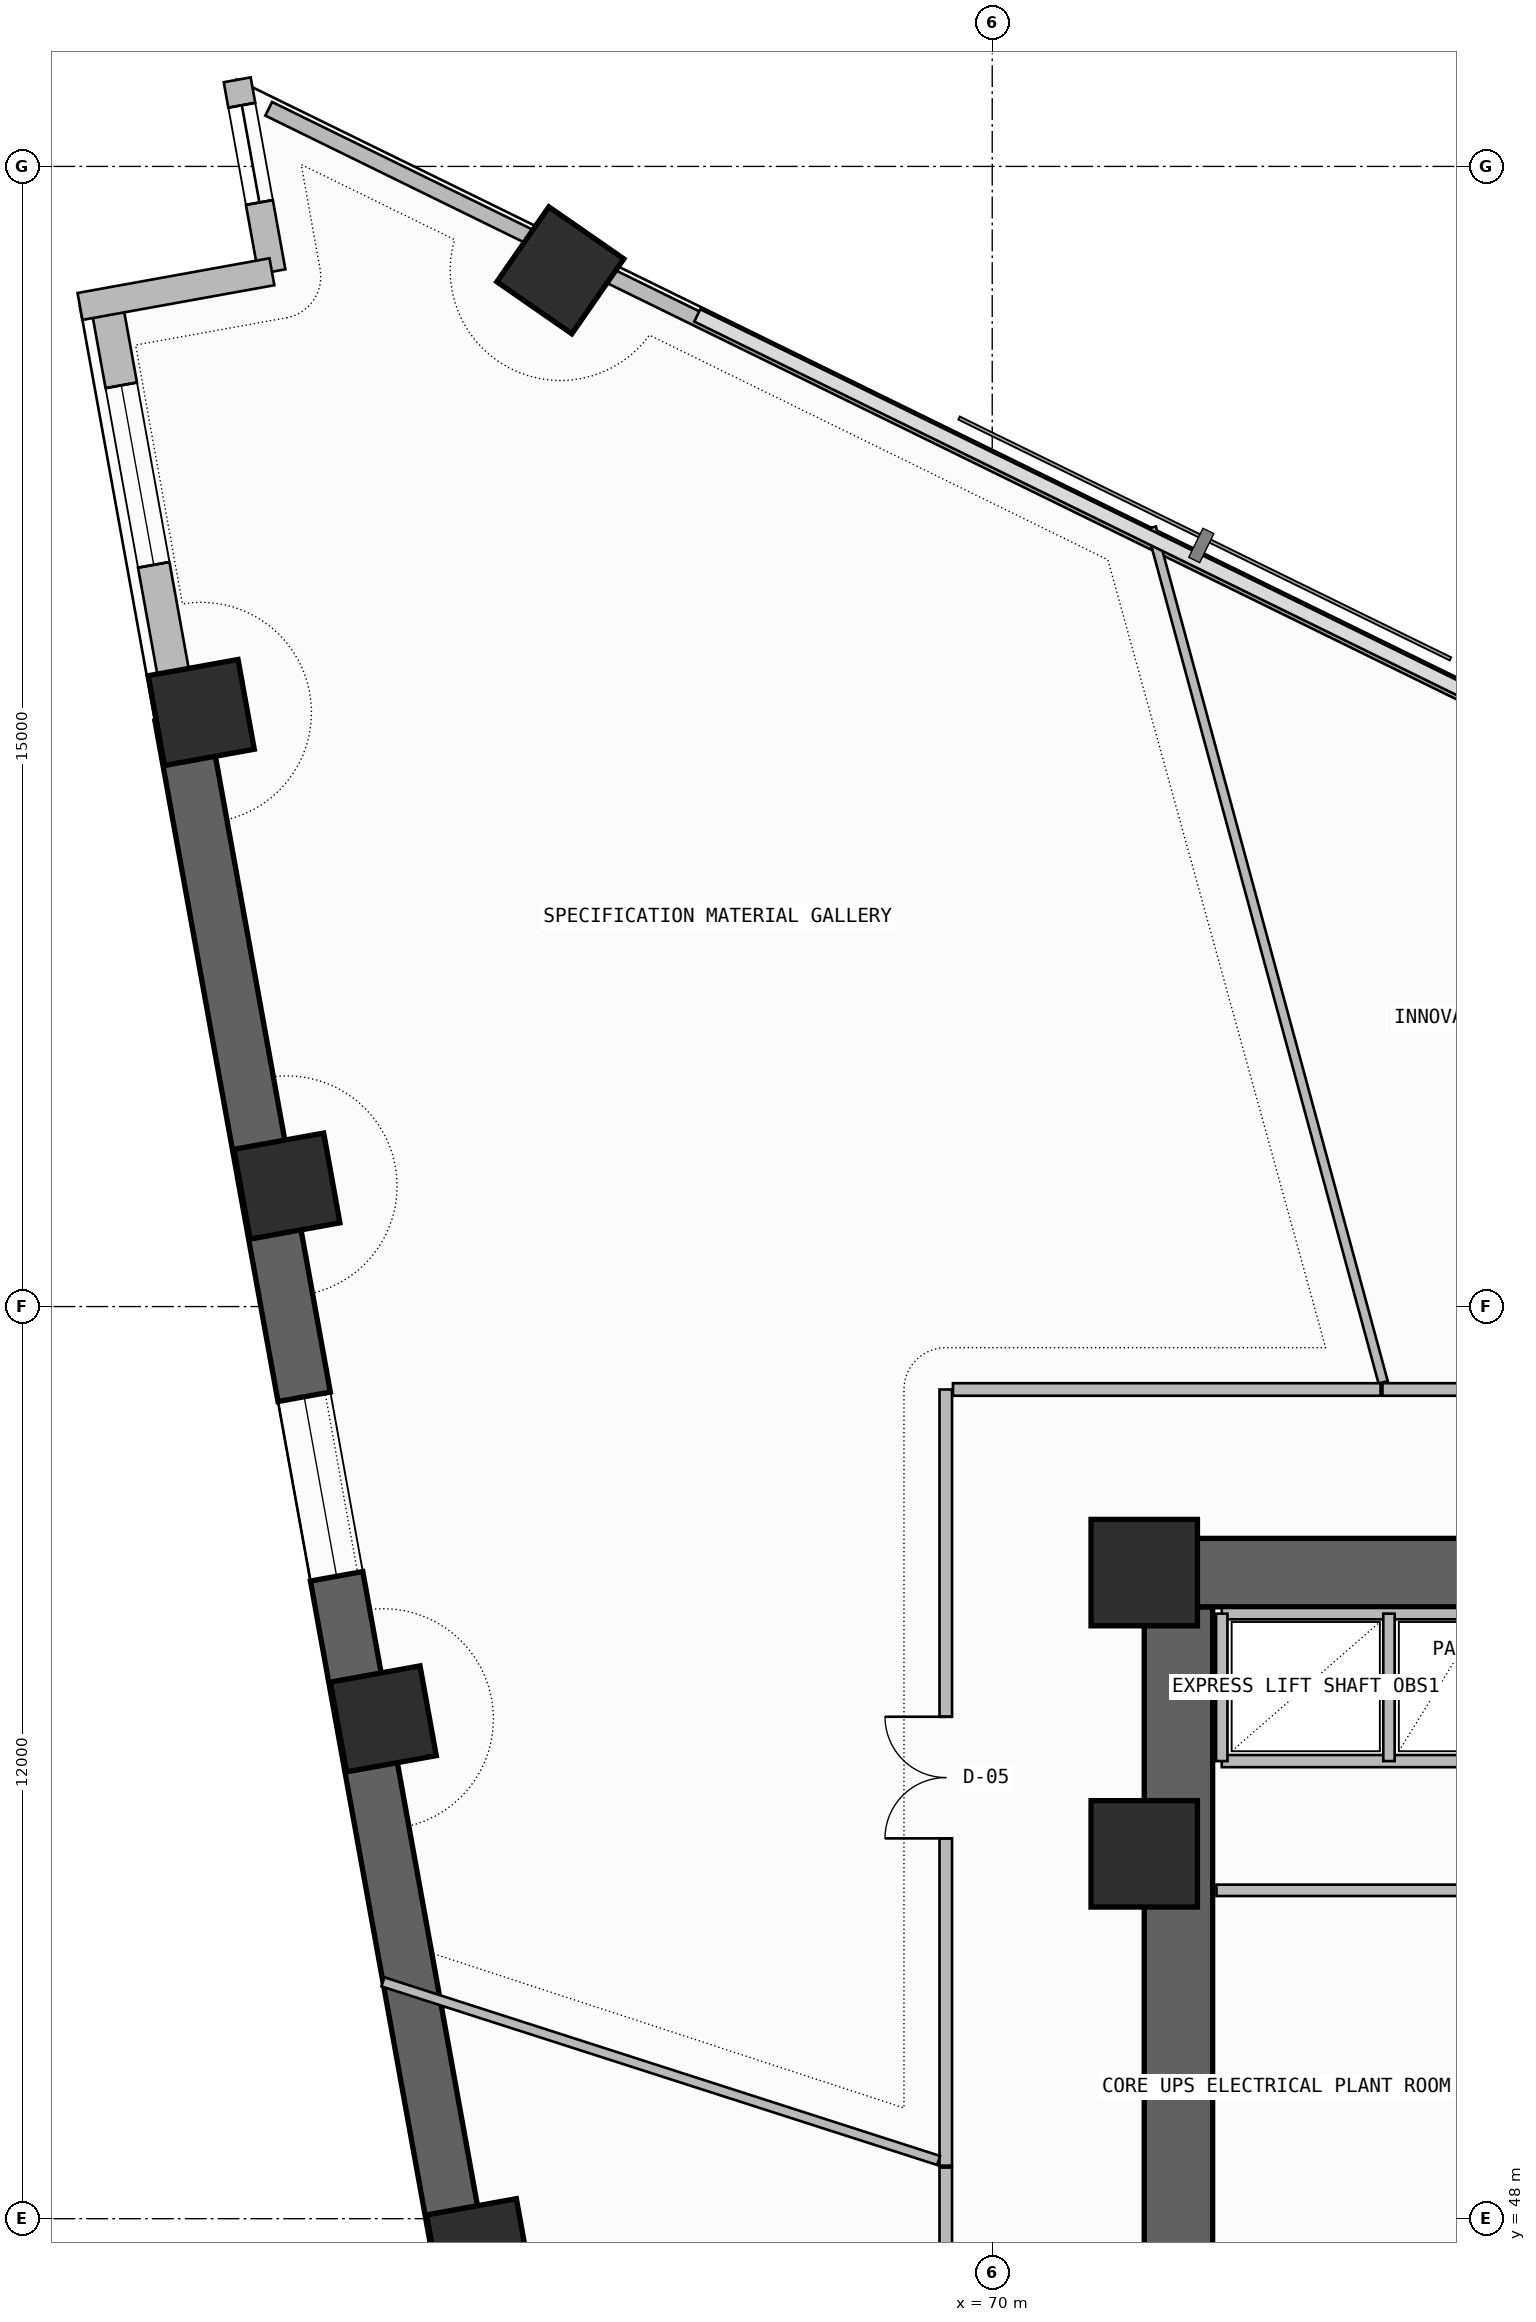
"""IFC4 building model, lengths in metres.
Left out: names, types, materials, properties, quantities, classifications, styles, units other than length and angle.
Written with IfcOpenShell. Run it as: python <this file> out.ifc"""

import sys

from ifc_helpers import new_model, si_unit, direction, frame, frame_2d, origin, origin_2d, place, context, subcontext, project, spatial, rectangle, extrude, element, fill, save


model = new_model("IFC4")
c1 = context("Model", 3, precision=1e-05, world=origin(), true_north=direction((0.0, 1.0)))
c2 = subcontext(c1, "Body", "Model", "MODEL_VIEW")
j1 = project(units=[si_unit("LENGTHUNIT", "METRE"), si_unit("PLANEANGLEUNIT", "RADIAN")], contexts=[c1])
p1 = place(None, origin())
s1 = spatial("IfcSite", under=j1, at=p1, CompositionType="ELEMENT")
p2 = place(p1, origin())
s2 = spatial("IfcBuilding", under=s1, at=p2, CompositionType="ELEMENT")
p3 = place(p2, frame((0.0, 0.0, 110.1)))
s3 = spatial("IfcBuildingStorey", under=s2, at=p3, CompositionType="ELEMENT", Elevation=110.1)
p4 = place(p3, frame((72.45, 43.35, -0.26), z_axis=(0.0, 0.0, 1.0), x_axis=(0.0, 1.0, 0.0)))
e1 = element("IfcWall", 1, at=p4, inside=s3, PredefinedType="SHEAR", context=c2, shape_type="SweptSolid", body=[
    extrude(rectangle(XDim=12.7, YDim=0.9, at=frame_2d((6.35, 0.0))), origin(), (0.0, 0.0, 1.0), 3.6),
])
p5 = place(p4, frame((1.35, 0.0, 0.26)))
e2 = element("IfcOpeningElement", 2, at=p5, cuts=e1, PredefinedType="OPENING", context=c2, shape_type="SweptSolid", body=[
    extrude(rectangle(XDim=1.2, YDim=2.2, at=frame_2d((0.6, 1.1))), frame((0.0, 0.46, 0.0), z_axis=(0.0, -1.0, 0.0), x_axis=(1.0, 0.0, 0.0)), (0.0, 0.0, 1.0), 0.92),
])
p6 = place(p3, frame((72.0, 56.5, -0.26), z_axis=(0.0, 0.0, 1.0), x_axis=(1.0, 0.0, 0.0)))
e3 = element("IfcWall", 3, at=p6, inside=s3, PredefinedType="SHEAR", context=c2, shape_type="SweptSolid", body=[
    extrude(rectangle(XDim=13.9, YDim=0.9, at=frame_2d((6.95, 0.0))), origin(), (0.0, 0.0, 1.0), 3.6),
])
for number, where, z_axis, x_axis in (
    (4, (72.0, 52.8, 0.0), (0.0, 0.0, 1.0), (1.0, 0.0, 0.0)),
    (5, (72.0, 56.5, 0.0), (0.0, 0.0, 1.0), (1.0, 0.0, 0.0)),
):
    element("IfcColumn", number, at=place(p3, frame(where, z_axis=z_axis, x_axis=x_axis)), inside=s3, PredefinedType="COLUMN", context=c2, shape_type="SweptSolid", body=[
        extrude(rectangle(XDim=1.4, YDim=1.4, at=origin_2d()), origin(), (0.0, 0.0, 1.0), 3.6),
    ])
for number, where, z_axis, x_axis in (
    (6, (64.318, 73.633, 0.0), (0.0, 0.0, 1.0), (0.57, 0.822, 0.0)),
    (7, (59.594, 67.816, 0.0), (0.0, 0.0, 1.0), (-0.178, 0.984, 0.0)),
    (8, (60.72, 61.585, 0.0), (0.0, 0.0, 1.0), (-0.178, 0.984, 0.0)),
    (9, (61.988, 54.575, 0.0), (0.0, 0.0, 1.0), (-0.178, 0.984, 0.0)),
    (10, (63.255, 47.566, 0.0), (0.0, 0.0, 1.0), (-0.178, 0.984, 0.0)),
):
    element("IfcColumn", number, at=place(p3, frame(where, z_axis=z_axis, x_axis=x_axis)), inside=s3, PredefinedType="COLUMN", context=c2, shape_type="SweptSolid", body=[
        extrude(rectangle(XDim=1.2, YDim=1.2, at=origin_2d()), origin(), (0.0, 0.0, 1.0), 3.6),
    ])
p7 = place(p3, frame((58.342, 73.22, 0.0), z_axis=(0.0, 0.0, 1.0), x_axis=(0.177981837245, -0.984033772597, 0.0)))
e11 = element("IfcWall", 11, at=p7, inside=s3, PredefinedType="SOLIDWALL", context=c2, shape_type="SweptSolid", body=[
    extrude(rectangle(XDim=5.54, YDim=0.42, at=frame_2d((2.77, 0.0))), origin(), (0.0, 0.0, 1.0), 2.725),
])
p8 = place(p7, frame((1.118, 0.0, 1.2)))
e12 = element("IfcOpeningElement", 12, at=p8, cuts=e11, PredefinedType="OPENING", context=c2, shape_type="SweptSolid", body=[
    extrude(rectangle(XDim=2.4, YDim=0.9, at=frame_2d((1.2, 0.45))), frame((0.0, 0.22, 0.0), z_axis=(0.0, -1.0, 0.0), x_axis=(1.0, 0.0, 0.0)), (0.0, 0.0, 1.0), 0.44),
])
p9 = place(p3, frame((59.328, 67.768, -0.26), z_axis=(0.0, 0.0, 1.0), x_axis=(0.177933213615, -0.984042565895, 0.0)))
e13 = element("IfcWall", 13, at=p9, inside=s3, PredefinedType="SHEAR", context=c2, shape_type="SweptSolid", body=[
    extrude(rectangle(XDim=20.579, YDim=0.7, at=frame_2d((10.289, 0.0))), origin(), (0.0, 0.0, 1.0), 3.6),
])
p10 = place(p9, frame((9.1, 0.0, 1.2)))
e14 = element("IfcOpeningElement", 14, at=p10, cuts=e13, PredefinedType="OPENING", context=c2, shape_type="SweptSolid", body=[
    extrude(rectangle(XDim=2.4, YDim=0.9, at=frame_2d((1.2, 0.45))), frame((0.0, 0.36, 0.0), z_axis=(0.0, -1.0, 0.0), x_axis=(1.0, 0.0, 0.0)), (0.0, 0.0, 1.0), 0.72),
])
p11 = place(p3, frame((60.066, 76.139, 0.0), z_axis=(0.0, 0.0, 1.0), x_axis=(0.177897493713, -0.984049024048, 0.0)))
e15 = element("IfcWall", 15, at=p11, inside=s3, PredefinedType="SOLIDWALL", context=c2, shape_type="SweptSolid", body=[
    extrude(rectangle(XDim=2.566, YDim=0.36, at=frame_2d((1.283, 0.0))), origin(), (0.0, 0.0, 1.0), 3.34),
])
p12 = place(p11, frame((0.34, 0.0, 0.45)))
e16 = element("IfcOpeningElement", 16, at=p12, cuts=e15, PredefinedType="OPENING", context=c2, shape_type="SweptSolid", body=[
    extrude(rectangle(XDim=1.3, YDim=2.4, at=frame_2d((0.65, 1.2))), frame((0.0, 0.19, 0.0), z_axis=(0.0, -1.0, 0.0), x_axis=(1.0, 0.0, 0.0)), (0.0, 0.0, 1.0), 0.38),
])
p13 = place(p3, frame((60.523, 73.614, 0.0), z_axis=(0.0, 0.0, 1.0), x_axis=(-0.984046012923, -0.177914149102, 0.0)))
e17 = element("IfcWall", 17, at=p13, inside=s3, PredefinedType="SOLIDWALL", context=c2, shape_type="SweptSolid", body=[
    extrude(rectangle(XDim=2.566, YDim=0.36, at=frame_2d((1.283, 0.0))), origin(), (0.0, 0.0, 1.0), 3.34),
])
p14 = place(p3, frame((88.921, 61.823, 0.0), z_axis=(0.0, 0.0, 1.0), x_axis=(-0.897993533426, 0.440008652103, 0.0)))
e18 = element("IfcWall", 18, at=p14, inside=s3, PredefinedType="PARAPET", context=c2, shape_type="SweptSolid", body=[
    extrude(rectangle(XDim=26.864, YDim=0.2, at=frame_2d((13.432, 0.0))), origin(), (0.0, 0.0, 1.0), 1.15),
])
p15 = place(p3, frame((64.032, 74.018, 0.0), z_axis=(0.0, 0.0, 1.0), x_axis=(-0.89799103332, 0.440013754417, 0.0)))
e19 = element("IfcWall", 19, at=p15, inside=s3, PredefinedType="PARAPET", context=c2, shape_type="SweptSolid", body=[
    extrude(rectangle(XDim=3.955, YDim=0.2, at=frame_2d((1.978, 0.0))), origin(), (0.0, 0.0, 1.0), 1.15),
])
p16 = place(p3, frame((72.95, 52.32, 0.0), z_axis=(0.0, 0.0, 1.0), x_axis=(1.0, 0.0, 0.0)))
e20 = element("IfcWall", 20, at=p16, inside=s3, PredefinedType="SOLIDWALL", context=c2, shape_type="SweptSolid", body=[
    extrude(rectangle(XDim=3.33, YDim=0.15, at=frame_2d((1.665, 0.0))), origin(), (0.0, 0.0, 1.0), 3.34),
])
p17 = place(p3, frame((73.02, 54.02, 0.0), z_axis=(0.0, 0.0, 1.0), x_axis=(1.0, 0.0, 0.0)))
e21 = element("IfcWall", 21, at=p17, inside=s3, PredefinedType="SOLIDWALL", context=c2, shape_type="SweptSolid", body=[
    extrude(rectangle(XDim=12.08, YDim=0.16, at=frame_2d((6.04, 0.0))), origin(), (0.0, 0.0, 1.0), 3.34),
])
p18 = place(p3, frame((73.02, 55.96, 0.0), z_axis=(0.0, 0.0, 1.0), x_axis=(1.0, 0.0, 0.0)))
e22 = element("IfcWall", 22, at=p18, inside=s3, PredefinedType="SOLIDWALL", context=c2, shape_type="SweptSolid", body=[
    extrude(rectangle(XDim=3.5, YDim=0.15, at=frame_2d((1.75, 0.0))), origin(), (0.0, 0.0, 1.0), 3.34),
])
for number, where, z_axis, x_axis in (
    (23, (73.02, 54.02, 0.0), (0.0, 0.0, 1.0), (0.0, 1.0, 0.0)),
    (24, (75.22, 54.02, 0.0), (0.0, 0.0, 1.0), (0.0, 1.0, 0.0)),
):
    element("IfcWall", number, at=place(p3, frame(where, z_axis=z_axis, x_axis=x_axis)), inside=s3, PredefinedType="PLUMBINGWALL", context=c2, shape_type="SweptSolid", body=[
        extrude(rectangle(XDim=1.94, YDim=0.15, at=frame_2d((0.97, 0.0))), origin(), (0.0, 0.0, 1.0), 3.34),
    ])
p19 = place(p3, frame((84.151, 58.909, 0.0), z_axis=(0.0, 0.0, 1.0), x_axis=(-1.0, 0.0, 0.0)))
e25 = element("IfcWall", 25, at=p19, inside=s3, PredefinedType="PARTITIONING", context=c2, shape_type="SweptSolid", body=[
    extrude(rectangle(XDim=9.017, YDim=0.165, at=frame_2d((4.508, 0.0))), origin(), (0.0, 0.0, 1.0), 3.34),
])
p20 = place(p19, frame((4.008, 0.0, 0.0)))
e26 = element("IfcOpeningElement", 26, at=p20, cuts=e25, PredefinedType="OPENING", context=c2, shape_type="SweptSolid", body=[
    extrude(rectangle(XDim=1.0, YDim=2.2, at=frame_2d((0.5, 1.1))), frame((0.0, 0.093, 0.0), z_axis=(0.0, -1.0, 0.0), x_axis=(1.0, 0.0, 0.0)), (0.0, 0.0, 1.0), 0.185),
])
p21 = place(p3, frame((75.144, 59.003, 0.0), z_axis=(0.0, 0.0, 1.0), x_axis=(-0.261861678482, 0.965105414627, 0.0)))
e27 = element("IfcWall", 27, at=p21, inside=s3, PredefinedType="PARTITIONING", context=c2, shape_type="SweptSolid", body=[
    extrude(rectangle(XDim=11.649, YDim=0.125, at=frame_2d((5.825, 0.0))), origin(), (0.0, 0.0, 1.0), 3.34),
])
p22 = place(p3, frame((69.389, 58.909, 0.0), z_axis=(0.0, 0.0, 1.0), x_axis=(0.0, -1.0, 0.0)))
e28 = element("IfcWall", 28, at=p22, inside=s3, PredefinedType="PARTITIONING", context=c2, shape_type="SweptSolid", body=[
    extrude(rectangle(XDim=10.211, YDim=0.165, at=frame_2d((5.105, 0.0))), origin(), (0.0, 0.0, 1.0), 2.725),
])
p23 = place(p22, frame((4.306, 0.0, 0.0)))
e29 = element("IfcOpeningElement", 29, at=p23, cuts=e28, PredefinedType="OPENING", context=c2, shape_type="SweptSolid", body=[
    extrude(rectangle(XDim=1.6, YDim=2.3, at=frame_2d((0.8, 1.15))), frame((0.0, 0.093, 0.0), z_axis=(0.0, -1.0, 0.0), x_axis=(1.0, 0.0, 0.0)), (0.0, 0.0, 1.0), 0.185),
])
p24 = place(p3, frame((75.109, 58.909, 0.0), z_axis=(0.0, 0.0, 1.0), x_axis=(-1.0, 0.0, 0.0)))
e30 = element("IfcWall", 30, at=p24, inside=s3, PredefinedType="PARTITIONING", context=c2, shape_type="SweptSolid", body=[
    extrude(rectangle(XDim=5.626, YDim=0.165, at=frame_2d((2.813, 0.0))), origin(), (0.0, 0.0, 1.0), 2.725),
])
p25 = place(p3, frame((69.294, 48.766, 0.0), z_axis=(0.0, 0.0, 1.0), x_axis=(-0.952039476867, 0.305975218747, 0.0)))
e31 = element("IfcWall", 31, at=p25, inside=s3, PredefinedType="PARTITIONING", context=c2, shape_type="SweptSolid", body=[
    extrude(rectangle(XDim=7.679, YDim=0.125, at=frame_2d((3.84, 0.0))), origin(), (0.0, 0.0, 1.0), 2.725),
])
p26 = place(p3, frame((69.389, 48.673, 0.0), z_axis=(0.0, 0.0, 1.0), x_axis=(0.0, -1.0, 0.0)))
e32 = element("IfcWall", 32, at=p26, inside=s3, PredefinedType="PARTITIONING", context=c2, shape_type="SweptSolid", body=[
    extrude(rectangle(XDim=6.346, YDim=0.165, at=frame_2d((3.173, 0.0))), origin(), (0.0, 0.0, 1.0), 3.34),
])
p27 = place(p26, frame((2.673, 0.0, 0.0)))
e33 = element("IfcOpeningElement", 33, at=p27, cuts=e32, PredefinedType="OPENING", context=c2, shape_type="SweptSolid", body=[
    extrude(rectangle(XDim=1.0, YDim=2.2, at=frame_2d((0.5, 1.1))), frame((0.0, 0.093, 0.0), z_axis=(0.0, -1.0, 0.0), x_axis=(1.0, 0.0, 0.0)), (0.0, 0.0, 1.0), 0.185),
])
p28 = place(p8, origin())
e34 = element("IfcWindow", 34, at=p28, inside=s3, PartitioningType="SINGLE_PANEL", PredefinedType="WINDOW", context=c2, shape_type="SweptSolid", body=[
    extrude(rectangle(XDim=2.4, YDim=0.9, at=frame_2d((1.2, 0.45))), frame((0.0, 0.03, 0.0), z_axis=(0.0, -1.0, 0.0), x_axis=(1.0, 0.0, 0.0)), (0.0, 0.0, 1.0), 0.06),
])
fill(e12, e34)
p29 = place(p10, origin())
e35 = element("IfcWindow", 35, at=p29, inside=s3, PartitioningType="SINGLE_PANEL", PredefinedType="WINDOW", context=c2, shape_type="SweptSolid", body=[
    extrude(rectangle(XDim=2.4, YDim=0.9, at=frame_2d((1.2, 0.45))), frame((0.0, 0.03, 0.0), z_axis=(0.0, -1.0, 0.0), x_axis=(1.0, 0.0, 0.0)), (0.0, 0.0, 1.0), 0.06),
])
fill(e14, e35)
p30 = place(p12, origin())
e36 = element("IfcWindow", 36, at=p30, inside=s3, PartitioningType="SINGLE_PANEL", PredefinedType="WINDOW", context=c2, shape_type="SweptSolid", body=[
    extrude(rectangle(XDim=1.3, YDim=2.4, at=frame_2d((0.65, 1.2))), frame((0.0, 0.03, 0.0), z_axis=(0.0, -1.0, 0.0), x_axis=(1.0, 0.0, 0.0)), (0.0, 0.0, 1.0), 0.06),
])
fill(e16, e36)
p31 = place(p23, frame((1.6, 0.0, 0.0), z_axis=(0.0, 0.0, 1.0), x_axis=(-1.0, 0.0, 0.0)))
e37 = element("IfcDoor", 37, at=p31, inside=s3, OperationType="DOUBLE_DOOR_SINGLE_SWING", PredefinedType="DOOR", context=c2, shape_type="SweptSolid", body=[
    extrude(rectangle(XDim=1.6, YDim=2.3, at=frame_2d((0.8, 1.15))), frame((0.0, 0.025, 0.0), z_axis=(0.0, -1.0, 0.0), x_axis=(1.0, 0.0, 0.0)), (0.0, 0.0, 1.0), 0.05),
])
fill(e29, e37)
save(model, sys.argv[1])
